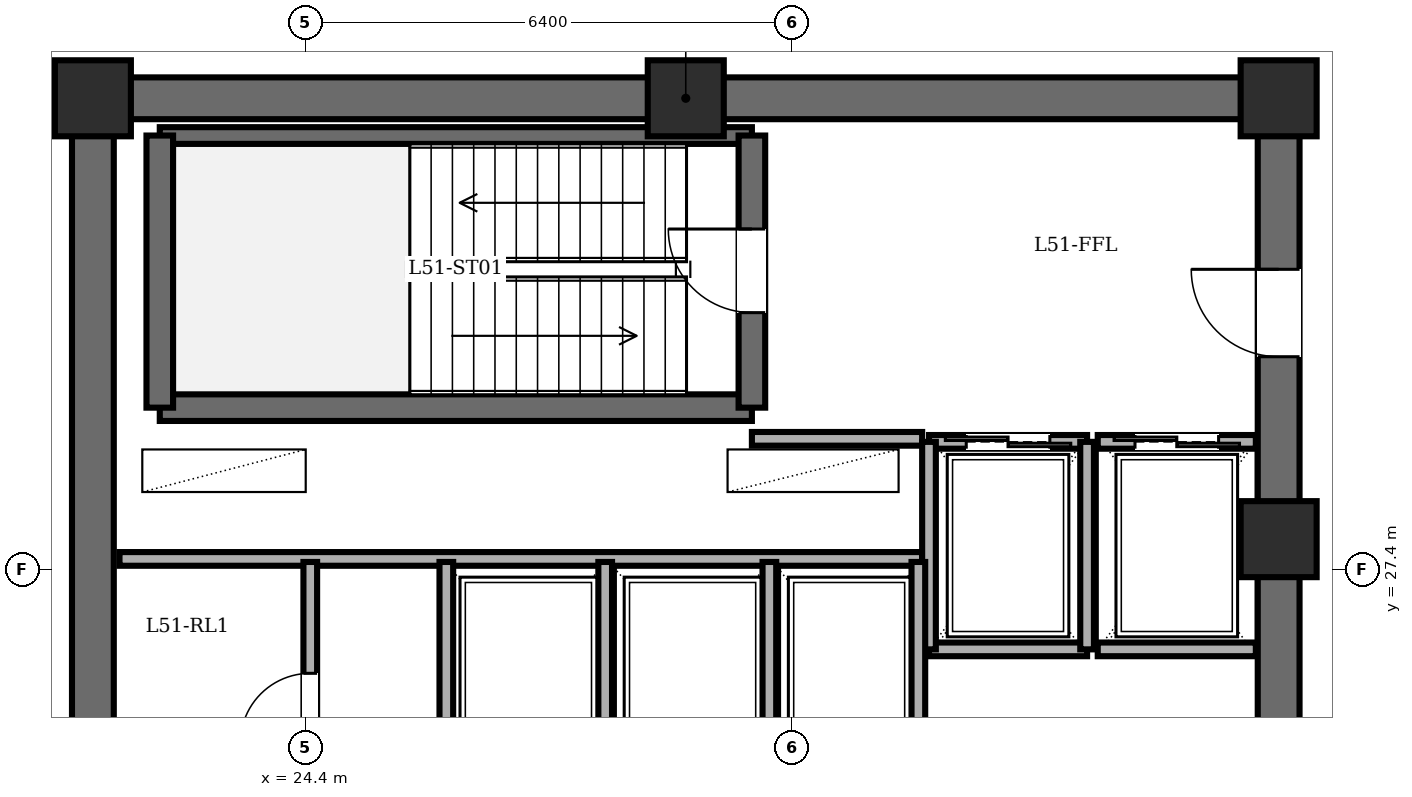
"""IFC4 building model, lengths in metres.
Left out: names, types, materials, properties, quantities, classifications, styles, units other than length and angle.
Written with IfcOpenShell. Run it as: python <this file> out.ifc"""

import sys

from ifc_helpers import new_model, si_unit, direction, frame, frame_2d, origin, origin_2d, place, context, subcontext, project, spatial, rectangle, extrude, element, fill, save


model = new_model("IFC4")
c1 = context("Model", 3, precision=1e-05, world=origin(), true_north=direction((0.0, 1.0)))
c2 = subcontext(c1, "Body", "Model", "MODEL_VIEW")
j1 = project(units=[si_unit("LENGTHUNIT", "METRE"), si_unit("PLANEANGLEUNIT", "RADIAN")], contexts=[c1])
p1 = place(None, origin())
s1 = spatial("IfcSite", under=j1, at=p1, CompositionType="ELEMENT")
p2 = place(p1, origin())
s2 = spatial("IfcBuilding", under=s1, at=p2, CompositionType="ELEMENT")
p3 = place(p2, frame((0.0, 0.0, 196.2)))
s3 = spatial("IfcBuildingStorey", under=s2, at=p3, CompositionType="ELEMENT", Elevation=196.2)
for number, where, z_axis, x_axis in (
    (1, (37.2, 27.8, 0.0), (0.0, 0.0, 1.0), (1.0, 0.0, 0.0)),
    (2, (37.2, 33.6, 0.0), (0.0, 0.0, 1.0), (1.0, 0.0, 0.0)),
    (3, (29.4, 33.6, 0.0), (0.0, 0.0, 1.0), (1.0, 0.0, 0.0)),
    (4, (21.6, 33.6, 0.0), (0.0, 0.0, 1.0), (1.0, 0.0, 0.0)),
):
    element("IfcColumn", number, at=place(p3, frame(where, z_axis=z_axis, x_axis=x_axis)), inside=s3, PredefinedType="COLUMN", context=c2, shape_type="SweptSolid", body=[
        extrude(rectangle(XDim=1.0, YDim=1.0, at=origin_2d()), origin(), (0.0, 0.0, 1.0), 5.1),
    ])
p4 = place(p3, frame((21.6, 14.4, 0.0), z_axis=(0.0, 0.0, 1.0), x_axis=(0.0, 1.0, 0.0)))
e5 = element("IfcWall", 5, at=p4, inside=s3, PredefinedType="SHEAR", context=c2, shape_type="SweptSolid", body=[
    extrude(rectangle(XDim=19.2, YDim=0.55, at=frame_2d((9.6, 0.0))), origin(), (0.0, 0.0, 1.0), 4.9),
])
p5 = place(p3, frame((21.6, 33.6, 0.0), z_axis=(0.0, 0.0, 1.0), x_axis=(1.0, 0.0, 0.0)))
e6 = element("IfcWall", 6, at=p5, inside=s3, PredefinedType="SHEAR", context=c2, shape_type="SweptSolid", body=[
    extrude(rectangle(XDim=15.6, YDim=0.55, at=frame_2d((7.8, 0.0))), origin(), (0.0, 0.0, 1.0), 4.9),
])
p6 = place(p3, frame((37.2, 14.4, 0.0), z_axis=(0.0, 0.0, 1.0), x_axis=(0.0, 1.0, 0.0)))
e7 = element("IfcWall", 7, at=p6, inside=s3, PredefinedType="SHEAR", context=c2, shape_type="SweptSolid", body=[
    extrude(rectangle(XDim=19.2, YDim=0.55, at=frame_2d((9.6, 0.0))), origin(), (0.0, 0.0, 1.0), 4.9),
])
p7 = place(p6, frame((15.8, 0.0, 0.0)))
e8 = element("IfcOpeningElement", 8, at=p7, cuts=e7, PredefinedType="OPENING", context=c2, shape_type="SweptSolid", body=[
    extrude(rectangle(XDim=1.15, YDim=2.15, at=frame_2d((0.575, 1.075))), frame((0.0, 0.285, 0.0), z_axis=(0.0, -1.0, 0.0), x_axis=(1.0, 0.0, 0.0)), (0.0, 0.0, 1.0), 0.57),
])
p8 = place(p6, frame((3.6, 0.0, 0.0)))
e9 = element("IfcOpeningElement", 9, at=p8, cuts=e7, PredefinedType="OPENING", context=c2, shape_type="SweptSolid", body=[
    extrude(rectangle(XDim=1.1, YDim=2.15, at=frame_2d((0.55, 1.075))), frame((0.0, 0.285, 0.0), z_axis=(0.0, -1.0, 0.0), x_axis=(1.0, 0.0, 0.0)), (0.0, 0.0, 1.0), 0.57),
])
p9 = place(p6, frame((8.6, 0.0, 0.0)))
e10 = element("IfcOpeningElement", 10, at=p9, cuts=e7, PredefinedType="OPENING", context=c2, shape_type="SweptSolid", body=[
    extrude(rectangle(XDim=1.3, YDim=2.2, at=frame_2d((0.65, 1.1))), frame((0.0, 0.285, 0.0), z_axis=(0.0, -1.0, 0.0), x_axis=(1.0, 0.0, 0.0)), (0.0, 0.0, 1.0), 0.57),
])
p10 = place(p3, frame((22.48, 29.53, 0.0), z_axis=(0.0, 0.0, 1.0), x_axis=(1.0, 0.0, 0.0)))
e11 = element("IfcWall", 11, at=p10, inside=s3, PredefinedType="SOLIDWALL", context=c2, shape_type="SweptSolid", body=[
    extrude(rectangle(XDim=7.79, YDim=0.35, at=frame_2d((3.895, 0.0))), origin(), (0.0, 0.0, 1.0), 4.9),
])
p11 = place(p3, frame((22.48, 33.11, 0.0), z_axis=(0.0, 0.0, 1.0), x_axis=(1.0, 0.0, 0.0)))
e12 = element("IfcWall", 12, at=p11, inside=s3, PredefinedType="PARTITIONING", context=c2, shape_type="SweptSolid", body=[
    extrude(rectangle(XDim=7.79, YDim=0.22, at=frame_2d((3.895, 0.0))), origin(), (0.0, 0.0, 1.0), 4.9),
])
p12 = place(p3, frame((22.48, 29.53, 0.0), z_axis=(0.0, 0.0, 1.0), x_axis=(0.0, 1.0, 0.0)))
e13 = element("IfcWall", 13, at=p12, inside=s3, PredefinedType="SOLIDWALL", context=c2, shape_type="SweptSolid", body=[
    extrude(rectangle(XDim=3.58, YDim=0.35, at=frame_2d((1.79, 0.0))), origin(), (0.0, 0.0, 1.0), 4.9),
])
p13 = place(p3, frame((30.27, 29.53, 0.0), z_axis=(0.0, 0.0, 1.0), x_axis=(0.0, 1.0, 0.0)))
e14 = element("IfcWall", 14, at=p13, inside=s3, PredefinedType="SOLIDWALL", context=c2, shape_type="SweptSolid", body=[
    extrude(rectangle(XDim=3.58, YDim=0.35, at=frame_2d((1.79, 0.0))), origin(), (0.0, 0.0, 1.0), 4.9),
])
p14 = place(p13, frame((1.25, 0.0, 0.0)))
e15 = element("IfcOpeningElement", 15, at=p14, cuts=e14, PredefinedType="OPENING", context=c2, shape_type="SweptSolid", body=[
    extrude(rectangle(XDim=1.1, YDim=2.15, at=frame_2d((0.55, 1.075))), frame((0.0, 0.185, 0.0), z_axis=(0.0, -1.0, 0.0), x_axis=(1.0, 0.0, 0.0)), (0.0, 0.0, 1.0), 0.37),
])
p15 = place(p3, frame((30.27, 29.12, 0.0), z_axis=(0.0, 0.0, 1.0), x_axis=(1.0, 0.0, 0.0)))
e16 = element("IfcWall", 16, at=p15, inside=s3, PredefinedType="PARTITIONING", context=c2, shape_type="SweptSolid", body=[
    extrude(rectangle(XDim=2.24, YDim=0.18, at=frame_2d((1.12, 0.0))), origin(), (0.0, 0.0, 1.0), 4.9),
])
p16 = place(p3, frame((21.95, 27.54, 0.0), z_axis=(0.0, 0.0, 1.0), x_axis=(1.0, 0.0, 0.0)))
e17 = element("IfcWall", 17, at=p16, inside=s3, PredefinedType="PARTITIONING", context=c2, shape_type="SweptSolid", body=[
    extrude(rectangle(XDim=10.56, YDim=0.18, at=frame_2d((5.28, 0.0))), origin(), (0.0, 0.0, 1.0), 4.9),
])
p17 = place(p3, frame((32.6, 29.08, 0.0), z_axis=(0.0, 0.0, 1.0), x_axis=(1.0, 0.0, 0.0)))
e18 = element("IfcWall", 18, at=p17, inside=s3, PredefinedType="PARTITIONING", context=c2, shape_type="SweptSolid", body=[
    extrude(rectangle(XDim=2.08, YDim=0.18, at=frame_2d((1.04, 0.0))), origin(), (0.0, 0.0, 1.0), 4.9),
])
p18 = place(p17, frame((0.49, 0.0, 0.0)))
e19 = element("IfcOpeningElement", 19, at=p18, cuts=e18, PredefinedType="OPENING", context=c2, shape_type="SweptSolid", body=[
    extrude(rectangle(XDim=1.1, YDim=2.2, at=frame_2d((0.55, 1.1))), frame((0.0, 0.1, 0.0), z_axis=(0.0, -1.0, 0.0), x_axis=(1.0, 0.0, 0.0)), (0.0, 0.0, 1.0), 0.2),
])
p19 = place(p3, frame((34.68, 26.35, 0.0), z_axis=(0.0, 0.0, 1.0), x_axis=(-1.0, 0.0, 0.0)))
e20 = element("IfcWall", 20, at=p19, inside=s3, PredefinedType="PARTITIONING", context=c2, shape_type="SweptSolid", body=[
    extrude(rectangle(XDim=2.08, YDim=0.18, at=frame_2d((1.04, 0.0))), origin(), (0.0, 0.0, 1.0), 4.9),
])
for number, where, z_axis, x_axis in (
    (21, (34.68, 26.35, 0.0), (0.0, 0.0, 1.0), (0.0, 1.0, 0.0)),
    (22, (32.6, 29.08, 0.0), (0.0, 0.0, 1.0), (0.0, -1.0, 0.0)),
):
    element("IfcWall", number, at=place(p3, frame(where, z_axis=z_axis, x_axis=x_axis)), inside=s3, PredefinedType="PARTITIONING", context=c2, shape_type="SweptSolid", body=[
        extrude(rectangle(XDim=2.73, YDim=0.18, at=frame_2d((1.365, 0.0))), origin(), (0.0, 0.0, 1.0), 4.9),
    ])
p20 = place(p3, frame((34.82, 29.08, 0.0), z_axis=(0.0, 0.0, 1.0), x_axis=(1.0, 0.0, 0.0)))
e23 = element("IfcWall", 23, at=p20, inside=s3, PredefinedType="PARTITIONING", context=c2, shape_type="SweptSolid", body=[
    extrude(rectangle(XDim=2.08, YDim=0.18, at=frame_2d((1.04, 0.0))), origin(), (0.0, 0.0, 1.0), 4.9),
])
p21 = place(p20, frame((0.49, 0.0, 0.0)))
e24 = element("IfcOpeningElement", 24, at=p21, cuts=e23, PredefinedType="OPENING", context=c2, shape_type="SweptSolid", body=[
    extrude(rectangle(XDim=1.1, YDim=2.2, at=frame_2d((0.55, 1.1))), frame((0.0, 0.1, 0.0), z_axis=(0.0, -1.0, 0.0), x_axis=(1.0, 0.0, 0.0)), (0.0, 0.0, 1.0), 0.2),
])
p22 = place(p3, frame((36.9, 26.35, 0.0), z_axis=(0.0, 0.0, 1.0), x_axis=(-1.0, 0.0, 0.0)))
e25 = element("IfcWall", 25, at=p22, inside=s3, PredefinedType="PARTITIONING", context=c2, shape_type="SweptSolid", body=[
    extrude(rectangle(XDim=2.08, YDim=0.18, at=frame_2d((1.04, 0.0))), origin(), (0.0, 0.0, 1.0), 4.9),
])
for number, where, z_axis, x_axis in (
    (26, (28.34, 25.0, 0.0), (0.0, 0.0, 1.0), (0.0, 1.0, 0.0)),
    (27, (30.5, 25.0, 0.0), (0.0, 0.0, 1.0), (0.0, 1.0, 0.0)),
    (28, (32.46, 25.0, 0.0), (0.0, 0.0, 1.0), (0.0, 1.0, 0.0)),
):
    element("IfcWall", number, at=place(p3, frame(where, z_axis=z_axis, x_axis=x_axis)), inside=s3, PredefinedType="PARTITIONING", context=c2, shape_type="SweptSolid", body=[
        extrude(rectangle(XDim=2.5, YDim=0.18, at=frame_2d((1.25, 0.0))), origin(), (0.0, 0.0, 1.0), 4.9),
    ])
p23 = place(p3, frame((24.46, 23.65, 0.0), z_axis=(0.0, 0.0, 1.0), x_axis=(0.0, 1.0, 0.0)))
e29 = element("IfcWall", 29, at=p23, inside=s3, PredefinedType="PARTITIONING", context=c2, shape_type="SweptSolid", body=[
    extrude(rectangle(XDim=3.85, YDim=0.18, at=frame_2d((1.925, 0.0))), origin(), (0.0, 0.0, 1.0), 4.9),
])
p24 = place(p23, frame((1.465, 0.0, 0.0)))
e30 = element("IfcOpeningElement", 30, at=p24, cuts=e29, PredefinedType="OPENING", context=c2, shape_type="SweptSolid", body=[
    extrude(rectangle(XDim=0.92, YDim=2.1, at=frame_2d((0.46, 1.05))), frame((0.0, 0.1, 0.0), z_axis=(0.0, -1.0, 0.0), x_axis=(1.0, 0.0, 0.0)), (0.0, 0.0, 1.0), 0.2),
])
p25 = place(p3, frame((26.25, 24.95, 0.0), z_axis=(0.0, 0.0, 1.0), x_axis=(0.0, 1.0, 0.0)))
e31 = element("IfcWall", 31, at=p25, inside=s3, PredefinedType="PARTITIONING", context=c2, shape_type="SweptSolid", body=[
    extrude(rectangle(XDim=2.55, YDim=0.18, at=frame_2d((1.275, 0.0))), origin(), (0.0, 0.0, 1.0), 4.9),
])
p26 = place(p3, frame((17.2, 33.8, 0.0), z_axis=(0.0, 0.0, 1.0), x_axis=(1.0, 0.0, 0.0)))
e32 = element("IfcWall", 32, at=p26, inside=s3, PredefinedType="PARTITIONING", context=c2, shape_type="SweptSolid", body=[
    extrude(rectangle(XDim=4.3, YDim=0.18, at=frame_2d((2.15, 0.0))), origin(), (0.0, 0.0, 1.0), 4.9),
])
p27 = place(p14, origin())
e33 = element("IfcDoor", 33, at=p27, inside=s3, OperationType="SINGLE_SWING_RIGHT", PredefinedType="DOOR", context=c2, shape_type="SweptSolid", body=[
    extrude(rectangle(XDim=1.1, YDim=2.15, at=frame_2d((0.55, 1.075))), frame((0.0, 0.025, 0.0), z_axis=(0.0, -1.0, 0.0), x_axis=(1.0, 0.0, 0.0)), (0.0, 0.0, 1.0), 0.05),
])
fill(e15, e33)
p28 = place(p7, origin())
e34 = element("IfcDoor", 34, at=p28, inside=s3, OperationType="SINGLE_SWING_RIGHT", PredefinedType="DOOR", context=c2, shape_type="SweptSolid", body=[
    extrude(rectangle(XDim=1.15, YDim=2.15, at=frame_2d((0.575, 1.075))), frame((0.0, 0.025, 0.0), z_axis=(0.0, -1.0, 0.0), x_axis=(1.0, 0.0, 0.0)), (0.0, 0.0, 1.0), 0.05),
])
fill(e8, e34)
p29 = place(p18, origin())
e35 = element("IfcDoor", 35, at=p29, inside=s3, OperationType="DOUBLE_DOOR_SLIDING", PredefinedType="DOOR", context=c2, shape_type="SweptSolid", body=[
    extrude(rectangle(XDim=1.1, YDim=2.2, at=frame_2d((0.55, 1.1))), frame((0.0, 0.025, 0.0), z_axis=(0.0, -1.0, 0.0), x_axis=(1.0, 0.0, 0.0)), (0.0, 0.0, 1.0), 0.05),
])
fill(e19, e35)
p30 = place(p21, origin())
e36 = element("IfcDoor", 36, at=p30, inside=s3, OperationType="DOUBLE_DOOR_SLIDING", PredefinedType="DOOR", context=c2, shape_type="SweptSolid", body=[
    extrude(rectangle(XDim=1.1, YDim=2.2, at=frame_2d((0.55, 1.1))), frame((0.0, 0.025, 0.0), z_axis=(0.0, -1.0, 0.0), x_axis=(1.0, 0.0, 0.0)), (0.0, 0.0, 1.0), 0.05),
])
fill(e24, e36)
p31 = place(p24, origin())
e37 = element("IfcDoor", 37, at=p31, inside=s3, OperationType="SINGLE_SWING_LEFT", PredefinedType="DOOR", context=c2, shape_type="SweptSolid", body=[
    extrude(rectangle(XDim=0.92, YDim=2.1, at=frame_2d((0.46, 1.05))), frame((0.0, 0.025, 0.0), z_axis=(0.0, -1.0, 0.0), x_axis=(1.0, 0.0, 0.0)), (0.0, 0.0, 1.0), 0.05),
])
fill(e30, e37)
save(model, sys.argv[1])
